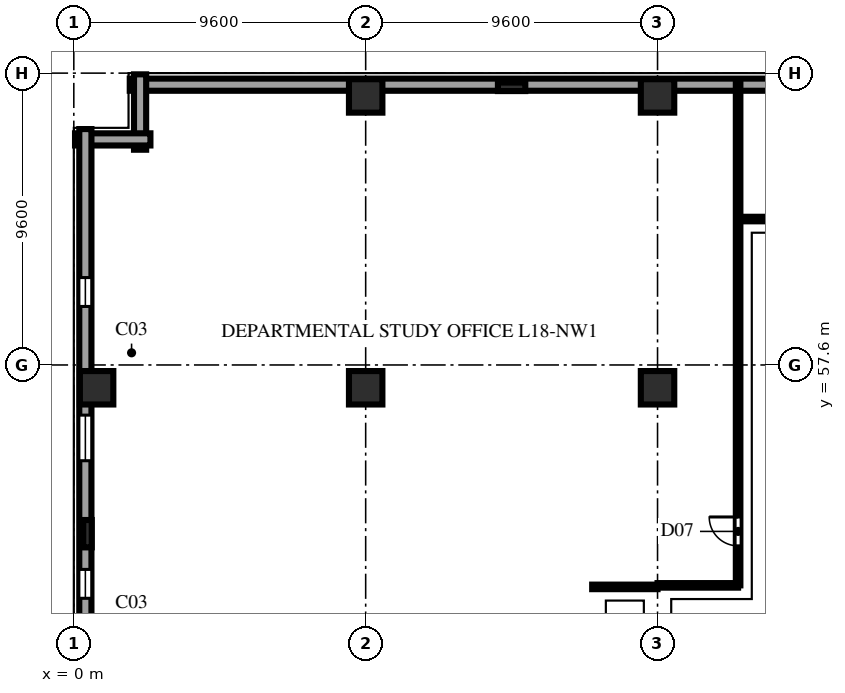
"""IFC4 building model, lengths in metres.
Left out: names, types, materials, properties, quantities, classifications, styles, units other than length and angle.
Written with IfcOpenShell. Run it as: python <this file> out.ifc"""

import sys

from ifc_helpers import new_model, si_unit, direction, frame, frame_2d, origin, origin_2d, place, context, subcontext, project, spatial, rectangle, extrude, element, fill, save


model = new_model("IFC4")
c1 = context("Model", 3, precision=1e-05, world=origin(), true_north=direction((0.0, 1.0)))
c2 = subcontext(c1, "Body", "Model", "MODEL_VIEW")
j1 = project(units=[si_unit("LENGTHUNIT", "METRE"), si_unit("PLANEANGLEUNIT", "RADIAN")], contexts=[c1])
p1 = place(None, origin())
s1 = spatial("IfcSite", under=j1, at=p1, CompositionType="ELEMENT")
p2 = place(p1, origin())
s2 = spatial("IfcBuilding", under=s1, at=p2, CompositionType="ELEMENT")
p3 = place(p2, frame((0.0, 0.0, 73.6)))
s3 = spatial("IfcBuildingStorey", under=s2, at=p3, CompositionType="ELEMENT", Elevation=73.6)
for number, where, z_axis, x_axis in (
    (1, (0.75, 56.85, 0.0), (0.0, 0.0, 1.0), (1.0, 0.0, 0.0)),
    (2, (9.6, 56.85, 0.0), (0.0, 0.0, 1.0), (1.0, 0.0, 0.0)),
    (3, (9.6, 66.45, 0.0), (0.0, 0.0, 1.0), (1.0, 0.0, 0.0)),
    (4, (19.2, 56.85, 0.0), (0.0, 0.0, 1.0), (1.0, 0.0, 0.0)),
    (5, (19.2, 66.45, 0.0), (0.0, 0.0, 1.0), (1.0, 0.0, 0.0)),
):
    element("IfcColumn", number, at=place(p3, frame(where, z_axis=z_axis, x_axis=x_axis)), inside=s3, PredefinedType="COLUMN", context=c2, shape_type="SweptSolid", body=[
        extrude(rectangle(XDim=1.1, YDim=1.1, at=origin_2d()), origin(), (0.0, 0.0, 1.0), 3.8),
    ])
for number, where, z_axis, x_axis in (
    (6, (0.45, 52.05, 0.0), (0.0, 0.0, 1.0), (0.0, 1.0, 0.0)),
    (7, (14.4, 66.75, 0.0), (0.0, 0.0, 1.0), (1.0, 0.0, 0.0)),
):
    element("IfcColumn", number, at=place(p3, frame(where, z_axis=z_axis, x_axis=x_axis)), inside=s3, PredefinedType="PILASTER", context=c2, shape_type="SweptSolid", body=[
        extrude(rectangle(XDim=0.9, YDim=0.28, at=origin_2d()), origin(), (0.0, 0.0, 1.0), 3.8),
    ])
p4 = place(p3, frame((36.56, 66.82, 0.0), z_axis=(0.0, 0.0, 1.0), x_axis=(-1.0, 0.0, 0.0)))
e8 = element("IfcWall", 8, at=p4, inside=s3, PredefinedType="SOLIDWALL", context=c2, shape_type="SweptSolid", body=[
    extrude(rectangle(XDim=34.72, YDim=0.4, at=frame_2d((17.36, 0.0))), origin(), (0.0, 0.0, 1.0), 3.54),
])
p5 = place(p4, frame((4.885, 0.0, 0.9)))
e9 = element("IfcOpeningElement", 9, at=p5, cuts=e8, PredefinedType="OPENING", context=c2, shape_type="SweptSolid", body=[
    extrude(rectangle(XDim=0.95, YDim=1.85, at=frame_2d((0.475, 0.925))), frame((0.0, 0.212, 0.0), z_axis=(0.0, -1.0, 0.0), x_axis=(1.0, 0.0, 0.0)), (0.0, 0.0, 1.0), 0.424),
])
p6 = place(p4, frame((9.41, 0.0, 0.9)))
e10 = element("IfcOpeningElement", 10, at=p6, cuts=e8, PredefinedType="OPENING", context=c2, shape_type="SweptSolid", body=[
    extrude(rectangle(XDim=1.5, YDim=1.85, at=frame_2d((0.75, 0.925))), frame((0.0, 0.212, 0.0), z_axis=(0.0, -1.0, 0.0), x_axis=(1.0, 0.0, 0.0)), (0.0, 0.0, 1.0), 0.424),
])
for number, where, z_axis, x_axis in (
    (11, (2.18, 67.16, 0.0), (0.0, 0.0, 1.0), (0.0, -1.0, 0.0)),
    (12, (2.52, 65.02, 0.0), (0.0, 0.0, 1.0), (-1.0, 0.0, 0.0)),
):
    element("IfcWall", number, at=place(p3, frame(where, z_axis=z_axis, x_axis=x_axis)), inside=s3, PredefinedType="SOLIDWALL", context=c2, shape_type="SweptSolid", body=[
        extrude(rectangle(XDim=2.48, YDim=0.4, at=frame_2d((1.24, 0.0))), origin(), (0.0, 0.0, 1.0), 3.54),
    ])
p7 = place(p3, frame((0.38, 65.36, 0.0), z_axis=(0.0, 0.0, 1.0), x_axis=(0.0, -1.0, 0.0)))
e13 = element("IfcWall", 13, at=p7, inside=s3, PredefinedType="SOLIDWALL", context=c2, shape_type="SweptSolid", body=[
    extrude(rectangle(XDim=63.52, YDim=0.4, at=frame_2d((31.76, 0.0))), origin(), (0.0, 0.0, 1.0), 3.54),
])
p8 = place(p7, frame((4.885, 0.0, 0.9)))
e14 = element("IfcOpeningElement", 14, at=p8, cuts=e13, PredefinedType="OPENING", context=c2, shape_type="SweptSolid", body=[
    extrude(rectangle(XDim=0.95, YDim=1.85, at=frame_2d((0.475, 0.925))), frame((0.0, 0.212, 0.0), z_axis=(0.0, -1.0, 0.0), x_axis=(1.0, 0.0, 0.0)), (0.0, 0.0, 1.0), 0.424),
])
p9 = place(p7, frame((9.41, 0.0, 0.9)))
e15 = element("IfcOpeningElement", 15, at=p9, cuts=e13, PredefinedType="OPENING", context=c2, shape_type="SweptSolid", body=[
    extrude(rectangle(XDim=1.5, YDim=1.85, at=frame_2d((0.75, 0.925))), frame((0.0, 0.212, 0.0), z_axis=(0.0, -1.0, 0.0), x_axis=(1.0, 0.0, 0.0)), (0.0, 0.0, 1.0), 0.424),
])
p10 = place(p7, frame((14.485, 0.0, 0.9)))
e16 = element("IfcOpeningElement", 16, at=p10, cuts=e13, PredefinedType="OPENING", context=c2, shape_type="SweptSolid", body=[
    extrude(rectangle(XDim=0.95, YDim=1.85, at=frame_2d((0.475, 0.925))), frame((0.0, 0.212, 0.0), z_axis=(0.0, -1.0, 0.0), x_axis=(1.0, 0.0, 0.0)), (0.0, 0.0, 1.0), 0.424),
])
p11 = place(p7, frame((19.01, 0.0, 0.9)))
e17 = element("IfcOpeningElement", 17, at=p11, cuts=e13, PredefinedType="OPENING", context=c2, shape_type="SweptSolid", body=[
    extrude(rectangle(XDim=1.5, YDim=1.85, at=frame_2d((0.75, 0.925))), frame((0.0, 0.212, 0.0), z_axis=(0.0, -1.0, 0.0), x_axis=(1.0, 0.0, 0.0)), (0.0, 0.0, 1.0), 0.424),
])
p12 = place(p7, frame((24.085, 0.0, 0.9)))
e18 = element("IfcOpeningElement", 18, at=p12, cuts=e13, PredefinedType="OPENING", context=c2, shape_type="SweptSolid", body=[
    extrude(rectangle(XDim=0.95, YDim=1.85, at=frame_2d((0.475, 0.925))), frame((0.0, 0.212, 0.0), z_axis=(0.0, -1.0, 0.0), x_axis=(1.0, 0.0, 0.0)), (0.0, 0.0, 1.0), 0.424),
])
p13 = place(p7, frame((28.61, 0.0, 0.9)))
e19 = element("IfcOpeningElement", 19, at=p13, cuts=e13, PredefinedType="OPENING", context=c2, shape_type="SweptSolid", body=[
    extrude(rectangle(XDim=1.5, YDim=1.85, at=frame_2d((0.75, 0.925))), frame((0.0, 0.212, 0.0), z_axis=(0.0, -1.0, 0.0), x_axis=(1.0, 0.0, 0.0)), (0.0, 0.0, 1.0), 0.424),
])
p14 = place(p7, frame((33.685, 0.0, 0.9)))
e20 = element("IfcOpeningElement", 20, at=p14, cuts=e13, PredefinedType="OPENING", context=c2, shape_type="SweptSolid", body=[
    extrude(rectangle(XDim=0.95, YDim=1.85, at=frame_2d((0.475, 0.925))), frame((0.0, 0.212, 0.0), z_axis=(0.0, -1.0, 0.0), x_axis=(1.0, 0.0, 0.0)), (0.0, 0.0, 1.0), 0.424),
])
p15 = place(p7, frame((38.21, 0.0, 0.9)))
e21 = element("IfcOpeningElement", 21, at=p15, cuts=e13, PredefinedType="OPENING", context=c2, shape_type="SweptSolid", body=[
    extrude(rectangle(XDim=1.5, YDim=1.85, at=frame_2d((0.75, 0.925))), frame((0.0, 0.212, 0.0), z_axis=(0.0, -1.0, 0.0), x_axis=(1.0, 0.0, 0.0)), (0.0, 0.0, 1.0), 0.424),
])
p16 = place(p7, frame((43.285, 0.0, 0.9)))
e22 = element("IfcOpeningElement", 22, at=p16, cuts=e13, PredefinedType="OPENING", context=c2, shape_type="SweptSolid", body=[
    extrude(rectangle(XDim=0.95, YDim=1.85, at=frame_2d((0.475, 0.925))), frame((0.0, 0.212, 0.0), z_axis=(0.0, -1.0, 0.0), x_axis=(1.0, 0.0, 0.0)), (0.0, 0.0, 1.0), 0.424),
])
p17 = place(p7, frame((47.81, 0.0, 0.9)))
e23 = element("IfcOpeningElement", 23, at=p17, cuts=e13, PredefinedType="OPENING", context=c2, shape_type="SweptSolid", body=[
    extrude(rectangle(XDim=1.5, YDim=1.85, at=frame_2d((0.75, 0.925))), frame((0.0, 0.212, 0.0), z_axis=(0.0, -1.0, 0.0), x_axis=(1.0, 0.0, 0.0)), (0.0, 0.0, 1.0), 0.424),
])
p18 = place(p7, frame((52.885, 0.0, 0.9)))
e24 = element("IfcOpeningElement", 24, at=p18, cuts=e13, PredefinedType="OPENING", context=c2, shape_type="SweptSolid", body=[
    extrude(rectangle(XDim=0.95, YDim=1.85, at=frame_2d((0.475, 0.925))), frame((0.0, 0.212, 0.0), z_axis=(0.0, -1.0, 0.0), x_axis=(1.0, 0.0, 0.0)), (0.0, 0.0, 1.0), 0.424),
])
p19 = place(p7, frame((57.41, 0.0, 0.9)))
e25 = element("IfcOpeningElement", 25, at=p19, cuts=e13, PredefinedType="OPENING", context=c2, shape_type="SweptSolid", body=[
    extrude(rectangle(XDim=1.5, YDim=1.85, at=frame_2d((0.75, 0.925))), frame((0.0, 0.212, 0.0), z_axis=(0.0, -1.0, 0.0), x_axis=(1.0, 0.0, 0.0)), (0.0, 0.0, 1.0), 0.424),
])
p20 = place(p3, frame((17.05, 50.3, 0.0), z_axis=(0.0, 0.0, 1.0), x_axis=(1.0, 0.0, 0.0)))
e26 = element("IfcWall", 26, at=p20, inside=s3, PredefinedType="PARTITIONING", context=c2, shape_type="SweptSolid", body=[
    extrude(rectangle(XDim=2.15, YDim=0.15, at=frame_2d((1.075, 0.0))), origin(), (0.0, 0.0, 1.0), 3.54),
])
p21 = place(p3, frame((19.2, 50.35, 0.0), z_axis=(0.0, 0.0, 1.0), x_axis=(1.0, 0.0, 0.0)))
e27 = element("IfcWall", 27, at=p21, inside=s3, PredefinedType="PARTITIONING", context=c2, shape_type="SweptSolid", body=[
    extrude(rectangle(XDim=2.65, YDim=0.15, at=frame_2d((1.325, 0.0))), origin(), (0.0, 0.0, 1.0), 3.54),
])
p22 = place(p3, frame((21.85, 62.4, 0.0), z_axis=(0.0, 0.0, 1.0), x_axis=(1.0, 0.0, 0.0)))
e28 = element("IfcWall", 28, at=p22, inside=s3, PredefinedType="PARTITIONING", context=c2, shape_type="SweptSolid", body=[
    extrude(rectangle(XDim=2.15, YDim=0.15, at=frame_2d((1.075, 0.0))), origin(), (0.0, 0.0, 1.0), 3.54),
])
p23 = place(p3, frame((21.85, 50.35, 0.0), z_axis=(0.0, 0.0, 1.0), x_axis=(0.0, 1.0, 0.0)))
e29 = element("IfcWall", 29, at=p23, inside=s3, PredefinedType="PARTITIONING", context=c2, shape_type="SweptSolid", body=[
    extrude(rectangle(XDim=16.63, YDim=0.15, at=frame_2d((8.315, 0.0))), origin(), (0.0, 0.0, 1.0), 3.54),
])
p24 = place(p23, frame((1.3, 0.0, 0.0)))
e30 = element("IfcOpeningElement", 30, at=p24, cuts=e29, PredefinedType="OPENING", context=c2, shape_type="SweptSolid", body=[
    extrude(rectangle(XDim=0.95, YDim=2.15, at=frame_2d((0.475, 1.075))), frame((0.0, 0.087, 0.0), z_axis=(0.0, -1.0, 0.0), x_axis=(1.0, 0.0, 0.0)), (0.0, 0.0, 1.0), 0.174),
])
p25 = place(p8, origin())
e31 = element("IfcWindow", 31, at=p25, inside=s3, PartitioningType="SINGLE_PANEL", PredefinedType="WINDOW", context=c2, shape_type="SweptSolid", body=[
    extrude(rectangle(XDim=0.95, YDim=1.85, at=frame_2d((0.475, 0.925))), frame((0.0, 0.11, 0.0), z_axis=(0.0, -1.0, 0.0), x_axis=(1.0, 0.0, 0.0)), (0.0, 0.0, 1.0), 0.06),
])
fill(e14, e31)
p26 = place(p9, origin())
e32 = element("IfcWindow", 32, at=p26, inside=s3, PartitioningType="DOUBLE_PANEL_VERTICAL", PredefinedType="WINDOW", context=c2, shape_type="SweptSolid", body=[
    extrude(rectangle(XDim=1.5, YDim=1.85, at=frame_2d((0.75, 0.925))), frame((0.0, 0.11, 0.0), z_axis=(0.0, -1.0, 0.0), x_axis=(1.0, 0.0, 0.0)), (0.0, 0.0, 1.0), 0.06),
])
fill(e15, e32)
p27 = place(p10, origin())
e33 = element("IfcWindow", 33, at=p27, inside=s3, PartitioningType="SINGLE_PANEL", PredefinedType="WINDOW", context=c2, shape_type="SweptSolid", body=[
    extrude(rectangle(XDim=0.95, YDim=1.85, at=frame_2d((0.475, 0.925))), frame((0.0, 0.11, 0.0), z_axis=(0.0, -1.0, 0.0), x_axis=(1.0, 0.0, 0.0)), (0.0, 0.0, 1.0), 0.06),
])
fill(e16, e33)
p28 = place(p24, origin())
e34 = element("IfcDoor", 34, at=p28, inside=s3, OperationType="SINGLE_SWING_RIGHT", PredefinedType="DOOR", context=c2, shape_type="SweptSolid", body=[
    extrude(rectangle(XDim=0.95, YDim=2.15, at=frame_2d((0.475, 1.075))), frame((0.0, 0.025, 0.0), z_axis=(0.0, -1.0, 0.0), x_axis=(1.0, 0.0, 0.0)), (0.0, 0.0, 1.0), 0.05),
])
fill(e30, e34)
save(model, sys.argv[1])
